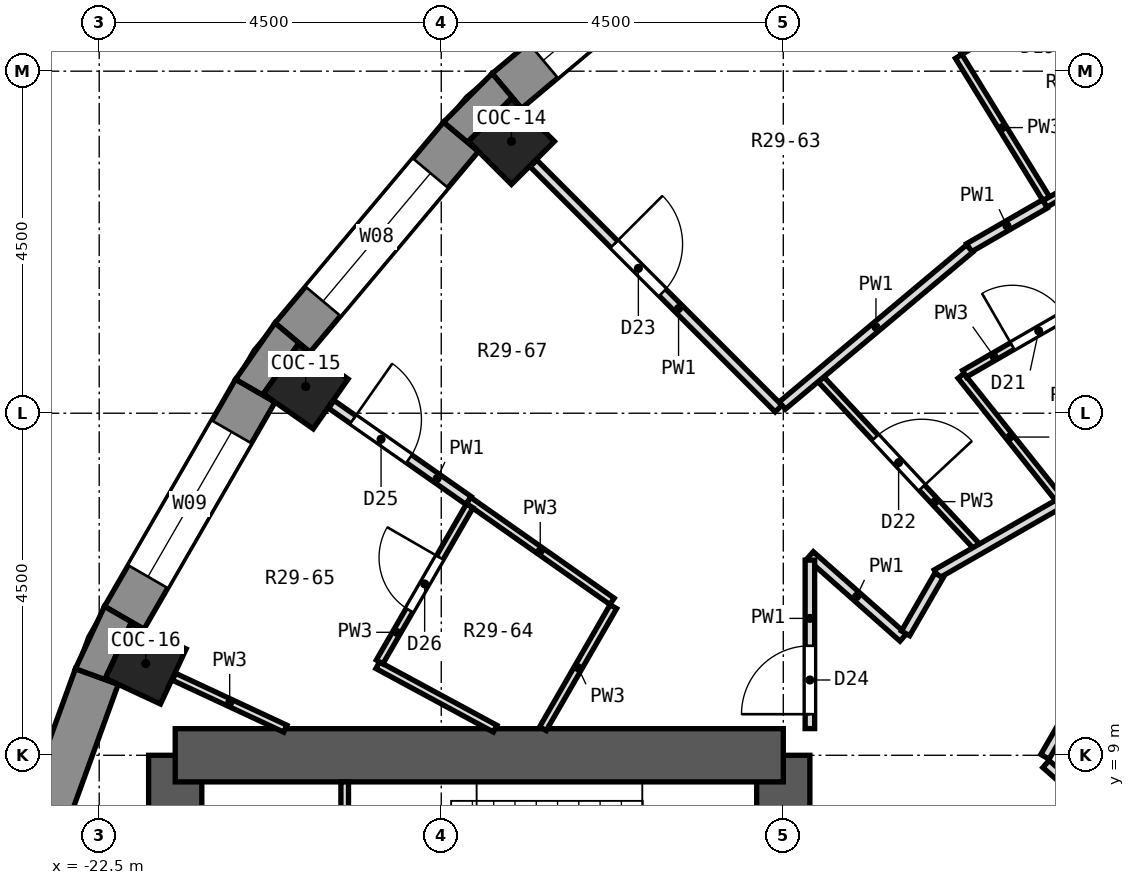
"""IFC4 building model, lengths in metres.
Left out: names, types, materials, properties, quantities, classifications, styles, units other than length and angle.
Written with IfcOpenShell. Run it as: python <this file> out.ifc"""

import sys

from ifc_helpers import new_model, si_unit, direction, frame, frame_2d, origin, origin_2d, place, context, subcontext, project, spatial, polyline, rectangle, outline, extrude, element, fill, save


model = new_model("IFC4")
c1 = context("Model", 3, precision=1e-05, world=origin(), true_north=direction((0.0, 1.0)))
c2 = subcontext(c1, "Body", "Model", "MODEL_VIEW")
j1 = project(units=[si_unit("LENGTHUNIT", "METRE"), si_unit("PLANEANGLEUNIT", "RADIAN")], contexts=[c1])
p1 = place(None, origin())
s1 = spatial("IfcSite", under=j1, at=p1, CompositionType="ELEMENT")
p2 = place(p1, origin())
s2 = spatial("IfcBuilding", under=s1, at=p2, CompositionType="ELEMENT")
p3 = place(p2, frame((0.0, 0.0, 200.4)))
s3 = spatial("IfcBuildingStorey", under=s2, at=p3, CompositionType="ELEMENT", Elevation=200.4)
for number, where, z_axis, x_axis in (
    (1, (-17.077, 17.077, 0.0), (0.0, 0.0, 1.0), (-0.707, 0.707, 0.0)),
    (2, (-19.782, 13.852, 0.0), (0.0, 0.0, 1.0), (-0.819, 0.574, 0.0)),
    (3, (-21.887, 10.206, 0.0), (0.0, 0.0, 1.0), (-0.906, 0.423, 0.0)),
):
    element("IfcColumn", number, at=place(p3, frame(where, z_axis=z_axis, x_axis=x_axis)), inside=s3, PredefinedType="COLUMN", context=c2, shape_type="SweptSolid", body=[
        extrude(rectangle(XDim=0.8, YDim=0.8, at=origin_2d()), origin(), (0.0, 0.0, 1.0), 3.3),
    ])
p4 = place(p3, frame((-13.5, -9.0, 0.0), z_axis=(0.0, 0.0, 1.0), x_axis=(0.0, 1.0, 0.0)))
e4 = element("IfcWall", 4, at=p4, inside=s3, PredefinedType="SHEAR", context=c2, shape_type="SweptSolid", body=[
    extrude(rectangle(XDim=18.0, YDim=0.7, at=frame_2d((9.0, 0.0))), origin(), (0.0, 0.0, 1.0), 3.3),
])
p5 = place(p4, frame((15.4, 0.0, 0.0)))
e5 = element("IfcOpeningElement", 5, at=p5, cuts=e4, PredefinedType="OPENING", context=c2, shape_type="SweptSolid", body=[
    extrude(rectangle(XDim=1.2, YDim=2.1, at=frame_2d((0.6, 1.05))), frame((0.0, 0.362, 0.0), z_axis=(0.0, -1.0, 0.0), x_axis=(1.0, 0.0, 0.0)), (0.0, 0.0, 1.0), 0.724),
])
p6 = place(p4, frame((1.4, 0.0, 0.0)))
e6 = element("IfcOpeningElement", 6, at=p6, cuts=e4, PredefinedType="OPENING", context=c2, shape_type="SweptSolid", body=[
    extrude(rectangle(XDim=1.2, YDim=2.1, at=frame_2d((0.6, 1.05))), frame((0.0, 0.362, 0.0), z_axis=(0.0, -1.0, 0.0), x_axis=(1.0, 0.0, 0.0)), (0.0, 0.0, 1.0), 0.724),
])
p7 = place(p4, frame((7.5, 0.0, 0.0)))
e7 = element("IfcOpeningElement", 7, at=p7, cuts=e4, PredefinedType="OPENING", context=c2, shape_type="SweptSolid", body=[
    extrude(rectangle(XDim=3.0, YDim=2.4, at=frame_2d((1.5, 1.2))), frame((0.0, 0.362, 0.0), z_axis=(0.0, -1.0, 0.0), x_axis=(1.0, 0.0, 0.0)), (0.0, 0.0, 1.0), 0.724),
])
p8 = place(p3, frame((-21.5, -9.0, 0.0), z_axis=(0.0, 0.0, 1.0), x_axis=(0.0, 1.0, 0.0)))
e8 = element("IfcWall", 8, at=p8, inside=s3, PredefinedType="SHEAR", context=c2, shape_type="SweptSolid", body=[
    extrude(rectangle(XDim=18.0, YDim=0.7, at=frame_2d((9.0, 0.0))), origin(), (0.0, 0.0, 1.0), 3.3),
])
p9 = place(p8, frame((9.45, 0.0, 0.0)))
e9 = element("IfcOpeningElement", 9, at=p9, cuts=e8, PredefinedType="OPENING", context=c2, shape_type="SweptSolid", body=[
    extrude(rectangle(XDim=0.9, YDim=2.1, at=frame_2d((0.45, 1.05))), frame((0.0, 0.362, 0.0), z_axis=(0.0, -1.0, 0.0), x_axis=(1.0, 0.0, 0.0)), (0.0, 0.0, 1.0), 0.724),
])
p10 = place(p8, frame((7.65, 0.0, 0.0)))
e10 = element("IfcOpeningElement", 10, at=p10, cuts=e8, PredefinedType="OPENING", context=c2, shape_type="SweptSolid", body=[
    extrude(rectangle(XDim=0.9, YDim=2.1, at=frame_2d((0.45, 1.05))), frame((0.0, 0.362, 0.0), z_axis=(0.0, -1.0, 0.0), x_axis=(1.0, 0.0, 0.0)), (0.0, 0.0, 1.0), 0.724),
])
p11 = place(p3, frame((-13.5, 9.0, 0.0), z_axis=(0.0, 0.0, 1.0), x_axis=(-1.0, 0.0, 0.0)))
e11 = element("IfcWall", 11, at=p11, inside=s3, PredefinedType="SHEAR", context=c2, shape_type="SweptSolid", body=[
    extrude(rectangle(XDim=8.0, YDim=0.7, at=frame_2d((4.0, 0.0))), origin(), (0.0, 0.0, 1.0), 3.3),
])
p12 = place(p3, frame((-14.494, 19.957, 0.0), z_axis=(0.0, 0.0, 1.0), x_axis=(-0.766058884809, -0.642770398358, 0.0)))
e12 = element("IfcWall", 12, at=p12, inside=s3, PredefinedType="SOLIDWALL", context=c2, shape_type="SweptSolid", body=[
    extrude(rectangle(XDim=3.449, YDim=0.6, at=frame_2d((1.725, 0.0))), origin(), (0.0, 0.0, 1.0), 2.85),
])
p13 = place(p12, frame((0.625, 0.0, 0.9)))
e13 = element("IfcOpeningElement", 13, at=p13, cuts=e12, PredefinedType="OPENING", context=c2, shape_type="SweptSolid", body=[
    extrude(rectangle(XDim=2.2, YDim=1.8, at=frame_2d((1.1, 0.9))), frame((0.0, 0.312, 0.0), z_axis=(0.0, -1.0, 0.0), x_axis=(1.0, 0.0, 0.0)), (0.0, 0.0, 1.0), 0.624),
])
p14 = place(p3, frame((-17.74, 17.137, 0.0), z_axis=(0.0, 0.0, 1.0), x_axis=(-0.642770398358, -0.766058884809, 0.0)))
e14 = element("IfcWall", 14, at=p14, inside=s3, PredefinedType="SOLIDWALL", context=c2, shape_type="SweptSolid", body=[
    extrude(rectangle(XDim=3.449, YDim=0.6, at=frame_2d((1.725, 0.0))), origin(), (0.0, 0.0, 1.0), 2.85),
])
p15 = place(p14, frame((0.625, 0.0, 0.9)))
e15 = element("IfcOpeningElement", 15, at=p15, cuts=e14, PredefinedType="OPENING", context=c2, shape_type="SweptSolid", body=[
    extrude(rectangle(XDim=2.2, YDim=1.8, at=frame_2d((1.1, 0.9))), frame((0.0, 0.312, 0.0), z_axis=(0.0, -1.0, 0.0), x_axis=(1.0, 0.0, 0.0)), (0.0, 0.0, 1.0), 0.624),
])
p16 = place(p3, frame((-20.446, 13.796, 0.0), z_axis=(0.0, 0.0, 1.0), x_axis=(-0.499998129301, -0.86602648383, 0.0)))
e16 = element("IfcWall", 16, at=p16, inside=s3, PredefinedType="SOLIDWALL", context=c2, shape_type="SweptSolid", body=[
    extrude(rectangle(XDim=3.45, YDim=0.6, at=frame_2d((1.725, 0.0))), origin(), (0.0, 0.0, 1.0), 2.85),
])
p17 = place(p16, frame((0.625, 0.0, 0.9)))
e17 = element("IfcOpeningElement", 17, at=p17, cuts=e16, PredefinedType="OPENING", context=c2, shape_type="SweptSolid", body=[
    extrude(rectangle(XDim=2.2, YDim=1.8, at=frame_2d((1.1, 0.9))), frame((0.0, 0.312, 0.0), z_axis=(0.0, -1.0, 0.0), x_axis=(1.0, 0.0, 0.0)), (0.0, 0.0, 1.0), 0.624),
])
p18 = place(p3, frame((-22.531, 10.036, 0.0), z_axis=(0.0, 0.0, 1.0), x_axis=(-0.342032843455, -0.93968799822, 0.0)))
e18 = element("IfcWall", 18, at=p18, inside=s3, PredefinedType="SOLIDWALL", context=c2, shape_type="SweptSolid", body=[
    extrude(rectangle(XDim=3.45, YDim=0.6, at=frame_2d((1.725, 0.0))), origin(), (0.0, 0.0, 1.0), 2.85),
])
p19 = place(p3, origin())
e19 = element("IfcWall", 19, at=p19, inside=s3, PredefinedType="SOLIDWALL", context=c2, shape_type="SweptSolid", body=[
    extrude(outline(polyline([(-17.969, 17.33), (-17.51, 16.944), (-17.642, 17.077), (-17.077, 17.642), (-16.944, 17.51), (-17.33, 17.969), (-17.969, 17.33)])), origin(), (0.0, 0.0, 1.0), 2.85),
])
p20 = place(p3, origin())
e20 = element("IfcWall", 20, at=p20, inside=s3, PredefinedType="SOLIDWALL", context=c2, shape_type="SweptSolid", body=[
    extrude(outline(polyline([(-20.187, 14.687), (-20.706, 13.946), (-20.186, 13.646), (-20.34, 13.754), (-19.881, 14.409), (-19.727, 14.302), (-20.187, 14.687)])), origin(), (0.0, 0.0, 1.0), 2.85),
])
p21 = place(p3, origin())
e21 = element("IfcWall", 21, at=p21, inside=s3, PredefinedType="SOLIDWALL", context=c2, shape_type="SweptSolid", body=[
    extrude(outline(polyline([(-22.813, 10.139), (-22.249, 9.934), (-22.419, 10.013), (-22.081, 10.738), (-21.911, 10.659), (-22.431, 10.959), (-22.813, 10.139)])), origin(), (0.0, 0.0, 1.0), 2.85),
])
p22 = place(p3, frame((-11.193, 18.195, 0.0), z_axis=(0.0, 0.0, 1.0), x_axis=(0.524029299745, -0.851700236591, 0.0)))
e22 = element("IfcWall", 22, at=p22, inside=s3, PredefinedType="PARTITIONING", context=c2, shape_type="SweptSolid", body=[
    extrude(rectangle(XDim=2.199, YDim=0.1, at=frame_2d((1.1, 0.0))), origin(), (0.0, 0.0, 1.0), 2.85),
])
p23 = place(p3, frame((-11.162, 13.992, 0.0), z_axis=(0.0, 0.0, 1.0), x_axis=(0.62359563311, -0.781747073142, 0.0)))
e23 = element("IfcWall", 23, at=p23, inside=s3, PredefinedType="PARTITIONING", context=c2, shape_type="SweptSolid", body=[
    extrude(rectangle(XDim=2.059, YDim=0.1, at=frame_2d((1.03, 0.0))), origin(), (0.0, 0.0, 1.0), 2.85),
])
p24 = place(p3, frame((-13.004, 13.946, 0.0), z_axis=(0.0, 0.0, 1.0), x_axis=(0.681856446627, -0.731486012302, 0.0)))
e24 = element("IfcWall", 24, at=p24, inside=s3, PredefinedType="PARTITIONING", context=c2, shape_type="SweptSolid", body=[
    extrude(rectangle(XDim=2.996, YDim=0.1, at=frame_2d((1.498, 0.0))), origin(), (0.0, 0.0, 1.0), 2.85),
])
p25 = place(p24, frame((1.048, 0.0, 0.0)))
e25 = element("IfcOpeningElement", 25, at=p25, cuts=e24, PredefinedType="OPENING", context=c2, shape_type="SweptSolid", body=[
    extrude(rectangle(XDim=0.9, YDim=2.1, at=frame_2d((0.45, 1.05))), frame((0.0, 0.062, 0.0), z_axis=(0.0, -1.0, 0.0), x_axis=(1.0, 0.0, 0.0)), (0.0, 0.0, 1.0), 0.124),
])
p26 = place(p3, frame((-16.787, 16.787, 0.0), z_axis=(0.0, 0.0, 1.0), x_axis=(0.707026475293, -0.707187077961, 0.0)))
e26 = element("IfcWall", 26, at=p26, inside=s3, PredefinedType="PARTITIONING", context=c2, shape_type="SweptSolid", body=[
    extrude(rectangle(XDim=4.561, YDim=0.125, at=frame_2d((2.28, 0.0))), origin(), (0.0, 0.0, 1.0), 2.85),
])
p27 = place(p26, frame((1.502, 0.0, 0.0)))
e27 = element("IfcOpeningElement", 27, at=p27, cuts=e26, PredefinedType="OPENING", context=c2, shape_type="SweptSolid", body=[
    extrude(rectangle(XDim=0.9, YDim=2.1, at=frame_2d((0.45, 1.05))), frame((0.0, 0.074, 0.0), z_axis=(0.0, -1.0, 0.0), x_axis=(1.0, 0.0, 0.0)), (0.0, 0.0, 1.0), 0.149),
])
p28 = place(p3, frame((-13.147, 11.631, 0.0), z_axis=(0.0, 0.0, 1.0), x_axis=(0.748973743587, -0.66259967659, 0.0)))
e28 = element("IfcWall", 28, at=p28, inside=s3, PredefinedType="PARTITIONING", context=c2, shape_type="SweptSolid", body=[
    extrude(rectangle(XDim=1.634, YDim=0.125, at=frame_2d((0.817, 0.0))), origin(), (0.0, 0.0, 1.0), 2.85),
])
p29 = place(p3, frame((-10.044, 8.886, 0.0), z_axis=(0.0, 0.0, 1.0), x_axis=(0.748977300745, -0.662595655712, 0.0)))
e29 = element("IfcWall", 29, at=p29, inside=s3, PredefinedType="PARTITIONING", context=c2, shape_type="SweptSolid", body=[
    extrude(rectangle(XDim=4.839, YDim=0.125, at=frame_2d((2.419, 0.0))), origin(), (0.0, 0.0, 1.0), 2.85),
])
p30 = place(p3, frame((-17.642, 12.353, 0.0), z_axis=(0.0, 0.0, 1.0), x_axis=(0.818197075576, -0.57493786231, 0.0)))
e30 = element("IfcWall", 30, at=p30, inside=s3, PredefinedType="PARTITIONING", context=c2, shape_type="SweptSolid", body=[
    extrude(rectangle(XDim=2.308, YDim=0.1, at=frame_2d((1.154, 0.0))), origin(), (0.0, 0.0, 1.0), 2.85),
])
p31 = place(p3, frame((-19.446, 13.617, 0.0), z_axis=(0.0, 0.0, 1.0), x_axis=(0.818955929984, -0.573856414746, 0.0)))
e31 = element("IfcWall", 31, at=p31, inside=s3, PredefinedType="PARTITIONING", context=c2, shape_type="SweptSolid", body=[
    extrude(rectangle(XDim=2.203, YDim=0.125, at=frame_2d((1.102, 0.0))), origin(), (0.0, 0.0, 1.0), 2.85),
])
p32 = place(p31, frame((0.349, 0.0, 0.0)))
e32 = element("IfcOpeningElement", 32, at=p32, cuts=e31, PredefinedType="OPENING", context=c2, shape_type="SweptSolid", body=[
    extrude(rectangle(XDim=0.9, YDim=2.1, at=frame_2d((0.45, 1.05))), frame((0.0, 0.074, 0.0), z_axis=(0.0, -1.0, 0.0), x_axis=(1.0, 0.0, 0.0)), (0.0, 0.0, 1.0), 0.149),
])
p33 = place(p3, frame((-18.836, 10.185, 0.0), z_axis=(0.0, 0.0, 1.0), x_axis=(0.879737947055, -0.475458877833, 0.0)))
e33 = element("IfcWall", 33, at=p33, inside=s3, PredefinedType="PARTITIONING", context=c2, shape_type="SweptSolid", body=[
    extrude(rectangle(XDim=1.756, YDim=0.1, at=frame_2d((0.878, 0.0))), origin(), (0.0, 0.0, 1.0), 2.85),
])
p34 = place(p3, frame((-21.516, 10.033, 0.0), z_axis=(0.0, 0.0, 1.0), x_axis=(0.906329754533, -0.422571149096, 0.0)))
e34 = element("IfcWall", 34, at=p34, inside=s3, PredefinedType="PARTITIONING", context=c2, shape_type="SweptSolid", body=[
    extrude(rectangle(XDim=1.616, YDim=0.1, at=frame_2d((0.808, 0.0))), origin(), (0.0, 0.0, 1.0), 2.85),
])
p35 = place(p3, frame((-11.484, 11.385, 0.0), z_axis=(0.0, 0.0, 1.0), x_axis=(0.867290156456, 0.497802957519, 0.0)))
e35 = element("IfcWall", 35, at=p35, inside=s3, PredefinedType="PARTITIONING", context=c2, shape_type="SweptSolid", body=[
    extrude(rectangle(XDim=8.48, YDim=0.125, at=frame_2d((4.24, 0.0))), origin(), (0.0, 0.0, 1.0), 2.85),
])
p36 = place(p3, frame((-11.117, 14.02, 0.0), z_axis=(0.0, 0.0, 1.0), x_axis=(0.866084712978, 0.49989725939, 0.0)))
e36 = element("IfcWall", 36, at=p36, inside=s3, PredefinedType="PARTITIONING", context=c2, shape_type="SweptSolid", body=[
    extrude(rectangle(XDim=2.257, YDim=0.1, at=frame_2d((1.128, 0.0))), origin(), (0.0, 0.0, 1.0), 2.85),
])
p37 = place(p36, frame((0.729, 0.0, 0.0)))
e37 = element("IfcOpeningElement", 37, at=p37, cuts=e36, PredefinedType="OPENING", context=c2, shape_type="SweptSolid", body=[
    extrude(rectangle(XDim=0.8, YDim=2.1, at=frame_2d((0.4, 1.05))), frame((0.0, 0.062, 0.0), z_axis=(0.0, -1.0, 0.0), x_axis=(1.0, 0.0, 0.0)), (0.0, 0.0, 1.0), 0.124),
])
p38 = place(p3, frame((-10.058, 16.253, 0.0), z_axis=(0.0, 0.0, 1.0), x_axis=(0.866039875853, 0.499974932805, 0.0)))
e38 = element("IfcWall", 38, at=p38, inside=s3, PredefinedType="PARTITIONING", context=c2, shape_type="SweptSolid", body=[
    extrude(rectangle(XDim=2.204, YDim=0.1, at=frame_2d((1.102, 0.0))), origin(), (0.0, 0.0, 1.0), 2.85),
])
p39 = place(p3, frame((-11.057, 15.677, 0.0), z_axis=(0.0, 0.0, 1.0), x_axis=(0.866308888763, 0.499508667843, 0.0)))
e39 = element("IfcWall", 39, at=p39, inside=s3, PredefinedType="PARTITIONING", context=c2, shape_type="SweptSolid", body=[
    extrude(rectangle(XDim=1.154, YDim=0.125, at=frame_2d((0.577, 0.0))), origin(), (0.0, 0.0, 1.0), 2.85),
])
p40 = place(p3, frame((-11.177, 18.264, 0.0), z_axis=(0.0, 0.0, 1.0), x_axis=(0.866180437728, 0.49973137714, 0.0)))
e40 = element("IfcWall", 40, at=p40, inside=s3, PredefinedType="PARTITIONING", context=c2, shape_type="SweptSolid", body=[
    extrude(rectangle(XDim=2.368, YDim=0.1, at=frame_2d((1.184, 0.0))), origin(), (0.0, 0.0, 1.0), 2.85),
])
p41 = place(p40, frame((0.785, 0.0, 0.0)))
e41 = element("IfcOpeningElement", 41, at=p41, cuts=e40, PredefinedType="OPENING", context=c2, shape_type="SweptSolid", body=[
    extrude(rectangle(XDim=0.8, YDim=2.1, at=frame_2d((0.4, 1.05))), frame((0.0, 0.062, 0.0), z_axis=(0.0, -1.0, 0.0), x_axis=(1.0, 0.0, 0.0)), (0.0, 0.0, 1.0), 0.124),
])
p42 = place(p3, frame((-13.513, 13.601, 0.0), z_axis=(0.0, 0.0, 1.0), x_axis=(0.766376010837, 0.642392255567, 0.0)))
e42 = element("IfcWall", 42, at=p42, inside=s3, PredefinedType="PARTITIONING", context=c2, shape_type="SweptSolid", body=[
    extrude(rectangle(XDim=3.216, YDim=0.125, at=frame_2d((1.608, 0.0))), origin(), (0.0, 0.0, 1.0), 2.85),
])
p43 = place(p3, frame((-10.058, 8.98, 0.0), z_axis=(0.0, 0.0, 1.0), x_axis=(0.500333617031, 0.865832704204, 0.0)))
e43 = element("IfcWall", 43, at=p43, inside=s3, PredefinedType="PARTITIONING", context=c2, shape_type="SweptSolid", body=[
    extrude(rectangle(XDim=0.726, YDim=0.125, at=frame_2d((0.363, 0.0))), origin(), (0.0, 0.0, 1.0), 2.85),
])
p44 = place(p3, frame((-11.891, 10.604, 0.0), z_axis=(0.0, 0.0, 1.0), x_axis=(0.500018690203, 0.866014612722, 0.0)))
e44 = element("IfcWall", 44, at=p44, inside=s3, PredefinedType="PARTITIONING", context=c2, shape_type="SweptSolid", body=[
    extrude(rectangle(XDim=0.88, YDim=0.125, at=frame_2d((0.44, 0.0))), origin(), (0.0, 0.0, 1.0), 2.85),
])
p45 = place(p3, frame((-16.662, 9.35, 0.0), z_axis=(0.0, 0.0, 1.0), x_axis=(0.499752869805, 0.866168037463, 0.0)))
e45 = element("IfcWall", 45, at=p45, inside=s3, PredefinedType="PARTITIONING", context=c2, shape_type="SweptSolid", body=[
    extrude(rectangle(XDim=1.853, YDim=0.1, at=frame_2d((0.927, 0.0))), origin(), (0.0, 0.0, 1.0), 2.85),
])
p46 = place(p3, frame((-18.811, 10.228, 0.0), z_axis=(0.0, 0.0, 1.0), x_axis=(0.500061319399, 0.865989998118, 0.0)))
e46 = element("IfcWall", 46, at=p46, inside=s3, PredefinedType="PARTITIONING", context=c2, shape_type="SweptSolid", body=[
    extrude(rectangle(XDim=2.37, YDim=0.1, at=frame_2d((1.185, 0.0))), origin(), (0.0, 0.0, 1.0), 2.85),
])
p47 = place(p46, frame((0.785, 0.0, 0.0)))
e47 = element("IfcOpeningElement", 47, at=p47, cuts=e46, PredefinedType="OPENING", context=c2, shape_type="SweptSolid", body=[
    extrude(rectangle(XDim=0.8, YDim=2.1, at=frame_2d((0.4, 1.05))), frame((0.0, 0.062, 0.0), z_axis=(0.0, -1.0, 0.0), x_axis=(1.0, 0.0, 0.0)), (0.0, 0.0, 1.0), 0.124),
])
p48 = place(p3, frame((-13.15, 9.351, 0.0), z_axis=(0.0, 0.0, 1.0), x_axis=(0.0, 1.0, 0.0)))
e48 = element("IfcWall", 48, at=p48, inside=s3, PredefinedType="PARTITIONING", context=c2, shape_type="SweptSolid", body=[
    extrude(rectangle(XDim=2.216, YDim=0.125, at=frame_2d((1.108, 0.0))), origin(), (0.0, 0.0, 1.0), 2.85),
])
p49 = place(p48, frame((0.189, 0.0, 0.0)))
e49 = element("IfcOpeningElement", 49, at=p49, cuts=e48, PredefinedType="OPENING", context=c2, shape_type="SweptSolid", body=[
    extrude(rectangle(XDim=0.9, YDim=2.1, at=frame_2d((0.45, 1.05))), frame((0.0, 0.074, 0.0), z_axis=(0.0, -1.0, 0.0), x_axis=(1.0, 0.0, 0.0)), (0.0, 0.0, 1.0), 0.149),
])
p50 = place(p3, frame((-19.27, 5.2, 0.0), z_axis=(0.0, 0.0, 1.0), x_axis=(0.0, 1.0, 0.0)))
e50 = element("IfcWall", 50, at=p50, inside=s3, PredefinedType="PARTITIONING", context=c2, shape_type="SweptSolid", body=[
    extrude(rectangle(XDim=3.45, YDim=0.1, at=frame_2d((1.725, 0.0))), origin(), (0.0, 0.0, 1.0), 2.85),
])
p51 = place(p13, origin())
e51 = element("IfcWindow", 51, at=p51, inside=s3, PartitioningType="SINGLE_PANEL", PredefinedType="WINDOW", context=c2, shape_type="SweptSolid", body=[
    extrude(rectangle(XDim=2.2, YDim=1.8, at=frame_2d((1.1, 0.9))), frame((0.0, 0.18, 0.0), z_axis=(0.0, -1.0, 0.0), x_axis=(1.0, 0.0, 0.0)), (0.0, 0.0, 1.0), 0.06),
])
fill(e13, e51)
p52 = place(p15, origin())
e52 = element("IfcWindow", 52, at=p52, inside=s3, PartitioningType="SINGLE_PANEL", PredefinedType="WINDOW", context=c2, shape_type="SweptSolid", body=[
    extrude(rectangle(XDim=2.2, YDim=1.8, at=frame_2d((1.1, 0.9))), frame((0.0, 0.18, 0.0), z_axis=(0.0, -1.0, 0.0), x_axis=(1.0, 0.0, 0.0)), (0.0, 0.0, 1.0), 0.06),
])
fill(e15, e52)
p53 = place(p17, origin())
e53 = element("IfcWindow", 53, at=p53, inside=s3, PartitioningType="SINGLE_PANEL", PredefinedType="WINDOW", context=c2, shape_type="SweptSolid", body=[
    extrude(rectangle(XDim=2.2, YDim=1.8, at=frame_2d((1.1, 0.9))), frame((0.0, 0.18, 0.0), z_axis=(0.0, -1.0, 0.0), x_axis=(1.0, 0.0, 0.0)), (0.0, 0.0, 1.0), 0.06),
])
fill(e17, e53)
p54 = place(p37, origin())
e54 = element("IfcDoor", 54, at=p54, inside=s3, OperationType="SINGLE_SWING_LEFT", PredefinedType="DOOR", context=c2, shape_type="SweptSolid", body=[
    extrude(rectangle(XDim=0.8, YDim=2.1, at=frame_2d((0.4, 1.05))), frame((0.0, 0.025, 0.0), z_axis=(0.0, -1.0, 0.0), x_axis=(1.0, 0.0, 0.0)), (0.0, 0.0, 1.0), 0.05),
])
fill(e37, e54)
p55 = place(p25, origin())
e55 = element("IfcDoor", 55, at=p55, inside=s3, OperationType="SINGLE_SWING_RIGHT", PredefinedType="DOOR", context=c2, shape_type="SweptSolid", body=[
    extrude(rectangle(XDim=0.9, YDim=2.1, at=frame_2d((0.45, 1.05))), frame((0.0, 0.025, 0.0), z_axis=(0.0, -1.0, 0.0), x_axis=(1.0, 0.0, 0.0)), (0.0, 0.0, 1.0), 0.05),
])
fill(e25, e55)
p56 = place(p27, origin())
e56 = element("IfcDoor", 56, at=p56, inside=s3, OperationType="SINGLE_SWING_LEFT", PredefinedType="DOOR", context=c2, shape_type="SweptSolid", body=[
    extrude(rectangle(XDim=0.9, YDim=2.1, at=frame_2d((0.45, 1.05))), frame((0.0, 0.025, 0.0), z_axis=(0.0, -1.0, 0.0), x_axis=(1.0, 0.0, 0.0)), (0.0, 0.0, 1.0), 0.05),
])
fill(e27, e56)
p57 = place(p49, origin())
e57 = element("IfcDoor", 57, at=p57, inside=s3, OperationType="SINGLE_SWING_LEFT", PredefinedType="DOOR", context=c2, shape_type="SweptSolid", body=[
    extrude(rectangle(XDim=0.9, YDim=2.1, at=frame_2d((0.45, 1.05))), frame((0.0, 0.025, 0.0), z_axis=(0.0, -1.0, 0.0), x_axis=(1.0, 0.0, 0.0)), (0.0, 0.0, 1.0), 0.05),
])
fill(e49, e57)
p58 = place(p32, origin())
e58 = element("IfcDoor", 58, at=p58, inside=s3, OperationType="SINGLE_SWING_LEFT", PredefinedType="DOOR", context=c2, shape_type="SweptSolid", body=[
    extrude(rectangle(XDim=0.9, YDim=2.1, at=frame_2d((0.45, 1.05))), frame((0.0, 0.025, 0.0), z_axis=(0.0, -1.0, 0.0), x_axis=(1.0, 0.0, 0.0)), (0.0, 0.0, 1.0), 0.05),
])
fill(e32, e58)
p59 = place(p47, origin())
e59 = element("IfcDoor", 59, at=p59, inside=s3, OperationType="SINGLE_SWING_RIGHT", PredefinedType="DOOR", context=c2, shape_type="SweptSolid", body=[
    extrude(rectangle(XDim=0.8, YDim=2.1, at=frame_2d((0.4, 1.05))), frame((0.0, 0.025, 0.0), z_axis=(0.0, -1.0, 0.0), x_axis=(1.0, 0.0, 0.0)), (0.0, 0.0, 1.0), 0.05),
])
fill(e47, e59)
save(model, sys.argv[1])
